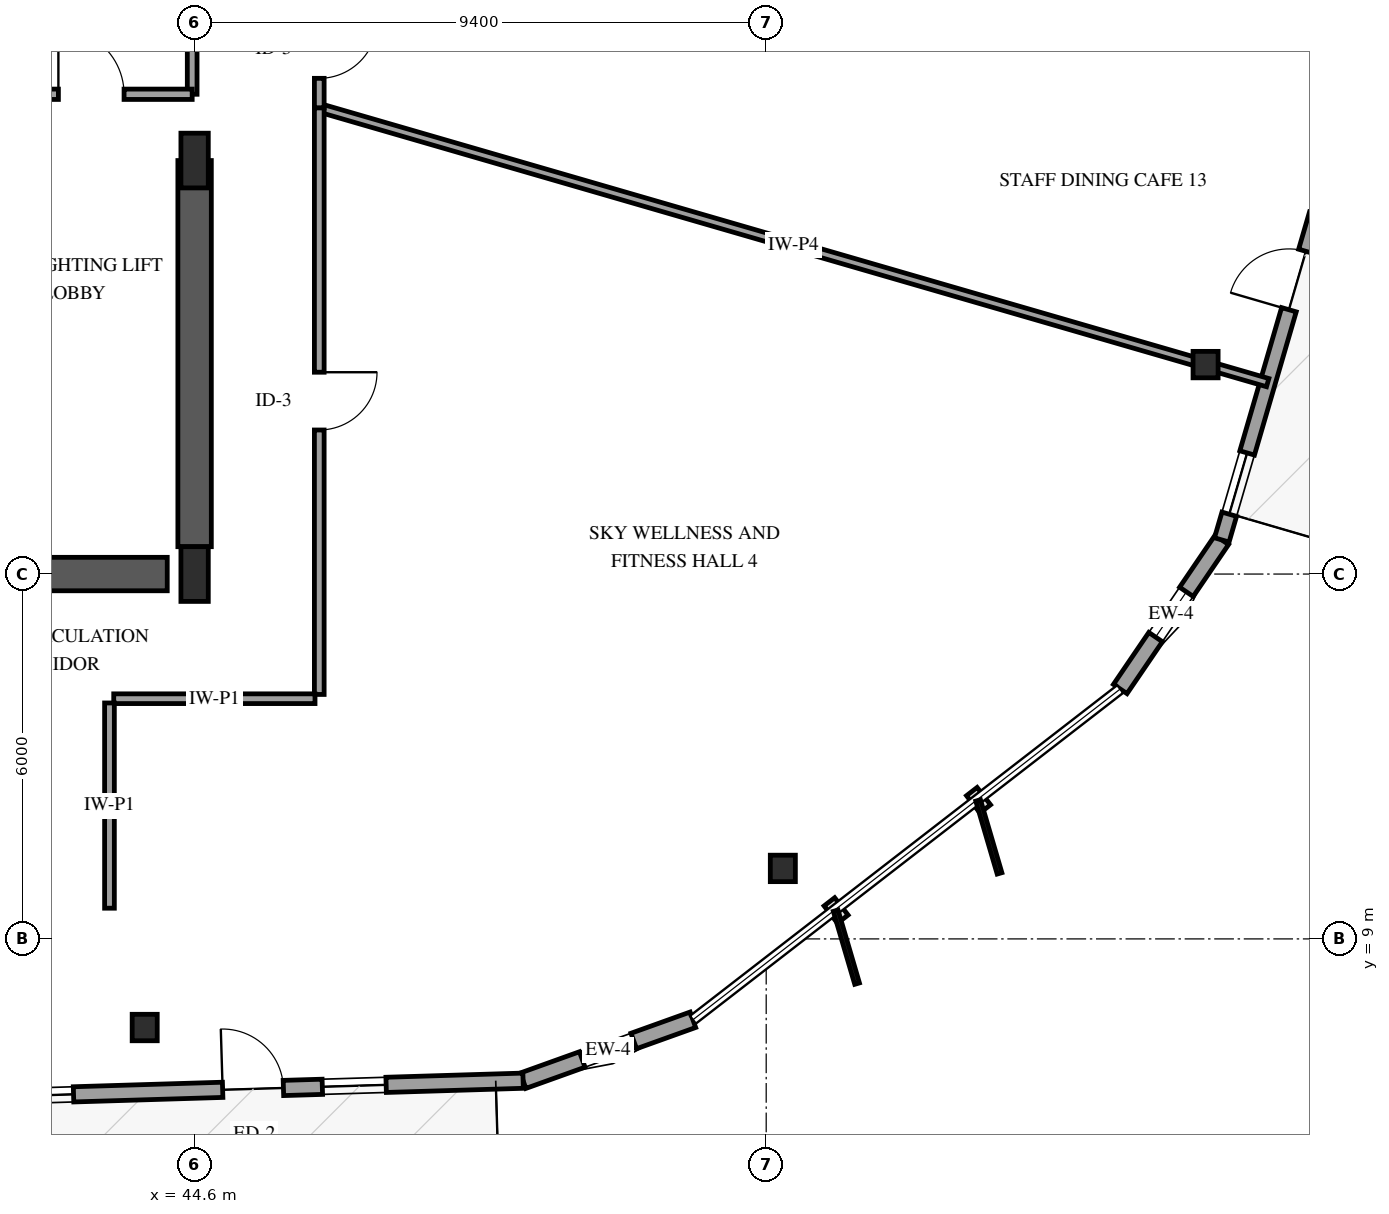
"""IFC4 building model, lengths in metres.
Left out: names, types, materials, properties, quantities, classifications, styles, units other than length and angle.
Written with IfcOpenShell. Run it as: python <this file> out.ifc"""

import sys

from ifc_helpers import new_model, si_unit, direction, frame, frame_2d, origin, origin_2d, place, context, subcontext, project, spatial, rectangle, i_section, extrude, element, fill, save


model = new_model("IFC4")
c1 = context("Model", 3, precision=1e-05, world=origin(), true_north=direction((0.0, 1.0)))
c2 = subcontext(c1, "Body", "Model", "MODEL_VIEW")
j1 = project(units=[si_unit("LENGTHUNIT", "METRE"), si_unit("PLANEANGLEUNIT", "RADIAN")], contexts=[c1])
p1 = place(None, origin())
s1 = spatial("IfcSite", under=j1, at=p1, CompositionType="ELEMENT")
p2 = place(p1, origin())
s2 = spatial("IfcBuilding", under=s1, at=p2, CompositionType="ELEMENT")
p3 = place(p2, frame((0.0, 0.0, 171.4)))
s3 = spatial("IfcBuildingStorey", under=s2, at=p3, CompositionType="ELEMENT", Elevation=171.4)
p4 = place(p3, frame((41.3, 15.0, 0.0), z_axis=(0.0, 0.0, 1.0), x_axis=(1.0, 0.0, 0.0)))
e1 = element("IfcWall", 1, at=p4, inside=s3, PredefinedType="SHEAR", context=c2, shape_type="SweptSolid", body=[
    extrude(rectangle(XDim=2.85, YDim=0.55, at=frame_2d((1.425, 0.0))), origin(), (0.0, 0.0, 1.0), 3.6),
])
p5 = place(p3, frame((44.6, 15.45, 0.0), z_axis=(0.0, 0.0, 1.0), x_axis=(0.0, 1.0, 0.0)))
e2 = element("IfcWall", 2, at=p5, inside=s3, PredefinedType="SHEAR", context=c2, shape_type="SweptSolid", body=[
    extrude(rectangle(XDim=6.35, YDim=0.55, at=frame_2d((3.175, 0.0))), origin(), (0.0, 0.0, 1.0), 3.6),
])
for number, where, z_axis, x_axis in (
    (3, (44.6, 15.0, 0.0), (0.0, 0.0, 1.0), (1.0, 0.0, 0.0)),
    (4, (44.6, 21.8, 0.0), (0.0, 0.0, 1.0), (1.0, 0.0, 0.0)),
):
    element("IfcColumn", number, at=place(p3, frame(where, z_axis=z_axis, x_axis=x_axis)), inside=s3, PredefinedType="PILASTER", context=c2, shape_type="SweptSolid", body=[
        extrude(rectangle(XDim=0.45, YDim=0.9, at=origin_2d()), origin(), (0.0, 0.0, 1.0), 3.6),
    ])
for number, where, z_axis, x_axis in (
    (5, (43.779, 7.542, 0.0), (0.0, 0.0, 1.0), (1.0, 0.0, 0.0)),
    (6, (54.274, 10.159, 0.0), (0.0, 0.0, 1.0), (1.0, 0.0, 0.0)),
    (7, (61.226, 18.444, 0.0), (0.0, 0.0, 1.0), (1.0, 0.0, 0.0)),
):
    element("IfcColumn", number, at=place(p3, frame(where, z_axis=z_axis, x_axis=x_axis)), inside=s3, PredefinedType="COLUMN", context=c2, shape_type="SweptSolid", body=[
        extrude(i_section(OverallWidth=0.412, OverallDepth=0.435, WebThickness=0.036, FlangeThickness=0.057, FilletRadius=0.038, at=origin_2d()), origin(), (0.0, 0.0, 1.0), 3.6),
    ])
p6 = place(p3, frame((50.002, 6.668, 0.0), z_axis=(0.0, 0.0, 1.0), x_axis=(0.94123626771, 0.337748853955, 0.0)))
e8 = element("IfcWall", 8, at=p6, inside=s3, PredefinedType="SOLIDWALL", context=c2, shape_type="SweptSolid", body=[
    extrude(rectangle(XDim=2.967, YDim=0.27, at=frame_2d((1.483, 0.0))), origin(), (0.0, 0.0, 1.0), 2.679),
])
p7 = place(p6, frame((1.033, 0.0, 0.75)))
e9 = element("IfcOpeningElement", 9, at=p7, cuts=e8, PredefinedType="OPENING", context=c2, shape_type="SweptSolid", body=[
    extrude(rectangle(XDim=0.9, YDim=1.5, at=frame_2d((0.45, 0.75))), frame((0.0, 0.145, 0.0), z_axis=(0.0, -1.0, 0.0), x_axis=(1.0, 0.0, 0.0)), (0.0, 0.0, 1.0), 0.29),
])
p8 = place(p3, frame((41.12, 6.398, 0.0), z_axis=(0.0, 0.0, 1.0), x_axis=(0.999539110065, 0.030357329429, 0.0)))
e10 = element("IfcWall", 10, at=p8, inside=s3, PredefinedType="SOLIDWALL", context=c2, shape_type="SweptSolid", body=[
    extrude(rectangle(XDim=8.887, YDim=0.25, at=frame_2d((4.443, 0.0))), origin(), (0.0, 0.0, 1.0), 2.679),
])
p9 = place(p8, frame((3.943, 0.0, 0.0)))
e11 = element("IfcOpeningElement", 11, at=p9, cuts=e10, PredefinedType="OPENING", context=c2, shape_type="SweptSolid", body=[
    extrude(rectangle(XDim=1.0, YDim=2.15, at=frame_2d((0.5, 1.075))), frame((0.0, 0.135, 0.0), z_axis=(0.0, -1.0, 0.0), x_axis=(1.0, 0.0, 0.0)), (0.0, 0.0, 1.0), 0.27),
])
p10 = place(p8, frame((0.44, 0.0, 0.72)))
e12 = element("IfcOpeningElement", 12, at=p10, cuts=e10, PredefinedType="OPENING", context=c2, shape_type="SweptSolid", body=[
    extrude(rectangle(XDim=1.05, YDim=1.55, at=frame_2d((0.525, 0.775))), frame((0.0, 0.135, 0.0), z_axis=(0.0, -1.0, 0.0), x_axis=(1.0, 0.0, 0.0)), (0.0, 0.0, 1.0), 0.27),
])
p11 = place(p8, frame((5.583, 0.0, 0.72)))
e13 = element("IfcOpeningElement", 13, at=p11, cuts=e10, PredefinedType="OPENING", context=c2, shape_type="SweptSolid", body=[
    extrude(rectangle(XDim=1.05, YDim=1.55, at=frame_2d((0.525, 0.775))), frame((0.0, 0.135, 0.0), z_axis=(0.0, -1.0, 0.0), x_axis=(1.0, 0.0, 0.0)), (0.0, 0.0, 1.0), 0.27),
])
p12 = place(p3, frame((59.822, 13.11, 0.0), z_axis=(0.0, 0.0, 1.0), x_axis=(0.563009904687, 0.826450148058, 0.0)))
e14 = element("IfcWall", 14, at=p12, inside=s3, PredefinedType="SOLIDWALL", context=c2, shape_type="SweptSolid", body=[
    extrude(rectangle(XDim=2.967, YDim=0.27, at=frame_2d((1.483, 0.0))), origin(), (0.0, 0.0, 1.0), 2.679),
])
p13 = place(p12, frame((1.033, 0.0, 0.75)))
e15 = element("IfcOpeningElement", 15, at=p13, cuts=e14, PredefinedType="OPENING", context=c2, shape_type="SweptSolid", body=[
    extrude(rectangle(XDim=0.9, YDim=1.5, at=frame_2d((0.45, 0.75))), frame((0.0, 0.145, 0.0), z_axis=(0.0, -1.0, 0.0), x_axis=(1.0, 0.0, 0.0)), (0.0, 0.0, 1.0), 0.29),
])
p14 = place(p3, frame((61.492, 15.561, 0.0), z_axis=(0.0, 0.0, 1.0), x_axis=(0.28, 0.96, 0.0)))
e16 = element("IfcWall", 16, at=p14, inside=s3, PredefinedType="SOLIDWALL", context=c2, shape_type="SweptSolid", body=[
    extrude(rectangle(XDim=8.887, YDim=0.25, at=frame_2d((4.443, 0.0))), origin(), (0.0, 0.0, 1.0), 2.679),
])
p15 = place(p14, frame((3.943, 0.0, 0.0)))
e17 = element("IfcOpeningElement", 17, at=p15, cuts=e16, PredefinedType="OPENING", context=c2, shape_type="SweptSolid", body=[
    extrude(rectangle(XDim=1.0, YDim=2.15, at=frame_2d((0.5, 1.075))), frame((0.0, 0.135, 0.0), z_axis=(0.0, -1.0, 0.0), x_axis=(1.0, 0.0, 0.0)), (0.0, 0.0, 1.0), 0.27),
])
p16 = place(p14, frame((0.44, 0.0, 0.72)))
e18 = element("IfcOpeningElement", 18, at=p16, cuts=e16, PredefinedType="OPENING", context=c2, shape_type="SweptSolid", body=[
    extrude(rectangle(XDim=1.05, YDim=1.55, at=frame_2d((0.525, 0.775))), frame((0.0, 0.135, 0.0), z_axis=(0.0, -1.0, 0.0), x_axis=(1.0, 0.0, 0.0)), (0.0, 0.0, 1.0), 0.27),
])
p17 = place(p14, frame((5.583, 0.0, 0.72)))
e19 = element("IfcOpeningElement", 19, at=p17, cuts=e16, PredefinedType="OPENING", context=c2, shape_type="SweptSolid", body=[
    extrude(rectangle(XDim=1.05, YDim=1.55, at=frame_2d((0.525, 0.775))), frame((0.0, 0.135, 0.0), z_axis=(0.0, -1.0, 0.0), x_axis=(1.0, 0.0, 0.0)), (0.0, 0.0, 1.0), 0.27),
])
p18 = place(p3, frame((46.65, 22.668, 0.0), z_axis=(0.0, 0.0, 1.0), x_axis=(0.960481163068, -0.278344993473, 0.0)))
e20 = element("IfcWall", 20, at=p18, inside=s3, PredefinedType="PARTITIONING", context=c2, shape_type="SweptSolid", body=[
    extrude(rectangle(XDim=16.239, YDim=0.14, at=frame_2d((8.12, 0.0))), origin(), (0.0, 0.0, 1.0), 3.3),
])
p19 = place(p3, frame((46.65, 22.668, 0.0), z_axis=(0.0, 0.0, 1.0), x_axis=(0.0, -1.0, 0.0)))
e21 = element("IfcWall", 21, at=p19, inside=s3, PredefinedType="PARTITIONING", context=c2, shape_type="SweptSolid", body=[
    extrude(rectangle(XDim=9.648, YDim=0.16, at=frame_2d((4.824, 0.0))), origin(), (0.0, 0.0, 1.0), 3.3),
])
p20 = place(p19, frame((4.349, 0.0, 0.0)))
e22 = element("IfcOpeningElement", 22, at=p20, cuts=e21, PredefinedType="OPENING", context=c2, shape_type="SweptSolid", body=[
    extrude(rectangle(XDim=0.95, YDim=2.15, at=frame_2d((0.475, 1.075))), frame((0.0, 0.09, 0.0), z_axis=(0.0, -1.0, 0.0), x_axis=(1.0, 0.0, 0.0)), (0.0, 0.0, 1.0), 0.18),
])
p21 = place(p3, frame((44.56, 29.8, 0.0), z_axis=(0.0, 0.0, 1.0), x_axis=(0.0, -1.0, 0.0)))
e23 = element("IfcWall", 23, at=p21, inside=s3, PredefinedType="PARTITIONING", context=c2, shape_type="SweptSolid", body=[
    extrude(rectangle(XDim=6.91, YDim=0.16, at=frame_2d((3.455, 0.0))), origin(), (0.0, 0.0, 1.0), 2.34),
])
p22 = place(p21, frame((2.915, 0.0, 0.0)))
e24 = element("IfcOpeningElement", 24, at=p22, cuts=e23, PredefinedType="OPENING", context=c2, shape_type="SweptSolid", body=[
    extrude(rectangle(XDim=1.08, YDim=2.15, at=frame_2d((0.54, 1.075))), frame((0.0, 0.09, 0.0), z_axis=(0.0, -1.0, 0.0), x_axis=(1.0, 0.0, 0.0)), (0.0, 0.0, 1.0), 0.18),
])
p23 = place(p3, frame((41.24, 22.89, 0.0), z_axis=(0.0, 0.0, 1.0), x_axis=(1.0, 0.0, 0.0)))
e25 = element("IfcWall", 25, at=p23, inside=s3, PredefinedType="PARTITIONING", context=c2, shape_type="SweptSolid", body=[
    extrude(rectangle(XDim=3.32, YDim=0.17, at=frame_2d((1.66, 0.0))), origin(), (0.0, 0.0, 1.0), 3.3),
])
p24 = place(p23, frame((1.12, 0.0, 0.0)))
e26 = element("IfcOpeningElement", 26, at=p24, cuts=e25, PredefinedType="OPENING", context=c2, shape_type="SweptSolid", body=[
    extrude(rectangle(XDim=1.08, YDim=2.15, at=frame_2d((0.54, 1.075))), frame((0.0, 0.095, 0.0), z_axis=(0.0, -1.0, 0.0), x_axis=(1.0, 0.0, 0.0)), (0.0, 0.0, 1.0), 0.19),
])
p25 = place(p3, frame((46.58, 12.95, 0.0), z_axis=(0.0, 0.0, 1.0), x_axis=(-1.0, 0.0, 0.0)))
e27 = element("IfcWall", 27, at=p25, inside=s3, PredefinedType="PARTITIONING", context=c2, shape_type="SweptSolid", body=[
    extrude(rectangle(XDim=3.31, YDim=0.16, at=frame_2d((1.655, 0.0))), origin(), (0.0, 0.0, 1.0), 3.3),
])
p26 = place(p3, frame((46.65, 24.586, 0.0), z_axis=(0.0, 0.0, 1.0), x_axis=(0.0, -1.0, 0.0)))
e28 = element("IfcWall", 28, at=p26, inside=s3, PredefinedType="PARTITIONING", context=c2, shape_type="SweptSolid", body=[
    extrude(rectangle(XDim=1.918, YDim=0.16, at=frame_2d((0.959, 0.0))), origin(), (0.0, 0.0, 1.0), 3.3),
])
p27 = place(p26, frame((0.484, 0.0, 0.0)))
e29 = element("IfcOpeningElement", 29, at=p27, cuts=e28, PredefinedType="OPENING", context=c2, shape_type="SweptSolid", body=[
    extrude(rectangle(XDim=0.95, YDim=2.15, at=frame_2d((0.475, 1.075))), frame((0.0, 0.09, 0.0), z_axis=(0.0, -1.0, 0.0), x_axis=(1.0, 0.0, 0.0)), (0.0, 0.0, 1.0), 0.18),
])
p28 = place(p3, frame((43.2, 12.88, 0.0), z_axis=(0.0, 0.0, 1.0), x_axis=(0.0, -1.0, 0.0)))
e30 = element("IfcWall", 30, at=p28, inside=s3, PredefinedType="PARTITIONING", context=c2, shape_type="SweptSolid", body=[
    extrude(rectangle(XDim=3.375, YDim=0.16, at=frame_2d((1.688, 0.0))), origin(), (0.0, 0.0, 1.0), 2.595),
])
p29 = place(p7, origin())
e31 = element("IfcWindow", 31, at=p29, inside=s3, PartitioningType="SINGLE_PANEL", PredefinedType="WINDOW", context=c2, shape_type="SweptSolid", body=[
    extrude(rectangle(XDim=0.9, YDim=1.5, at=frame_2d((0.45, 0.75))), frame((0.0, 0.03, 0.0), z_axis=(0.0, -1.0, 0.0), x_axis=(1.0, 0.0, 0.0)), (0.0, 0.0, 1.0), 0.06),
])
fill(e9, e31)
p30 = place(p9, origin())
e32 = element("IfcDoor", 32, at=p30, inside=s3, OperationType="SINGLE_SWING_LEFT", PredefinedType="DOOR", context=c2, shape_type="SweptSolid", body=[
    extrude(rectangle(XDim=1.0, YDim=2.15, at=frame_2d((0.5, 1.075))), frame((0.0, 0.025, 0.0), z_axis=(0.0, -1.0, 0.0), x_axis=(1.0, 0.0, 0.0)), (0.0, 0.0, 1.0), 0.05),
])
fill(e11, e32)
p31 = place(p10, origin())
e33 = element("IfcWindow", 33, at=p31, inside=s3, PartitioningType="SINGLE_PANEL", PredefinedType="WINDOW", context=c2, shape_type="SweptSolid", body=[
    extrude(rectangle(XDim=1.05, YDim=1.55, at=frame_2d((0.525, 0.775))), frame((0.0, 0.03, 0.0), z_axis=(0.0, -1.0, 0.0), x_axis=(1.0, 0.0, 0.0)), (0.0, 0.0, 1.0), 0.06),
])
fill(e12, e33)
p32 = place(p11, origin())
e34 = element("IfcWindow", 34, at=p32, inside=s3, PartitioningType="SINGLE_PANEL", PredefinedType="WINDOW", context=c2, shape_type="SweptSolid", body=[
    extrude(rectangle(XDim=1.05, YDim=1.55, at=frame_2d((0.525, 0.775))), frame((0.0, 0.03, 0.0), z_axis=(0.0, -1.0, 0.0), x_axis=(1.0, 0.0, 0.0)), (0.0, 0.0, 1.0), 0.06),
])
fill(e13, e34)
p33 = place(p13, origin())
e35 = element("IfcWindow", 35, at=p33, inside=s3, PartitioningType="SINGLE_PANEL", PredefinedType="WINDOW", context=c2, shape_type="SweptSolid", body=[
    extrude(rectangle(XDim=0.9, YDim=1.5, at=frame_2d((0.45, 0.75))), frame((0.0, 0.03, 0.0), z_axis=(0.0, -1.0, 0.0), x_axis=(1.0, 0.0, 0.0)), (0.0, 0.0, 1.0), 0.06),
])
fill(e15, e35)
p34 = place(p15, origin())
e36 = element("IfcDoor", 36, at=p34, inside=s3, OperationType="SINGLE_SWING_LEFT", PredefinedType="DOOR", context=c2, shape_type="SweptSolid", body=[
    extrude(rectangle(XDim=1.0, YDim=2.15, at=frame_2d((0.5, 1.075))), frame((0.0, 0.025, 0.0), z_axis=(0.0, -1.0, 0.0), x_axis=(1.0, 0.0, 0.0)), (0.0, 0.0, 1.0), 0.05),
])
fill(e17, e36)
p35 = place(p16, origin())
e37 = element("IfcWindow", 37, at=p35, inside=s3, PartitioningType="SINGLE_PANEL", PredefinedType="WINDOW", context=c2, shape_type="SweptSolid", body=[
    extrude(rectangle(XDim=1.05, YDim=1.55, at=frame_2d((0.525, 0.775))), frame((0.0, 0.03, 0.0), z_axis=(0.0, -1.0, 0.0), x_axis=(1.0, 0.0, 0.0)), (0.0, 0.0, 1.0), 0.06),
])
fill(e18, e37)
p36 = place(p20, origin())
e38 = element("IfcDoor", 38, at=p36, inside=s3, OperationType="SINGLE_SWING_LEFT", PredefinedType="DOOR", context=c2, shape_type="SweptSolid", body=[
    extrude(rectangle(XDim=0.95, YDim=2.15, at=frame_2d((0.475, 1.075))), frame((0.0, 0.025, 0.0), z_axis=(0.0, -1.0, 0.0), x_axis=(1.0, 0.0, 0.0)), (0.0, 0.0, 1.0), 0.05),
])
fill(e22, e38)
p37 = place(p24, origin())
e39 = element("IfcDoor", 39, at=p37, inside=s3, OperationType="SINGLE_SWING_LEFT", PredefinedType="DOOR", context=c2, shape_type="SweptSolid", body=[
    extrude(rectangle(XDim=1.08, YDim=2.15, at=frame_2d((0.54, 1.075))), frame((0.0, 0.025, 0.0), z_axis=(0.0, -1.0, 0.0), x_axis=(1.0, 0.0, 0.0)), (0.0, 0.0, 1.0), 0.05),
])
fill(e26, e39)
p38 = place(p27, origin())
e40 = element("IfcDoor", 40, at=p38, inside=s3, OperationType="SINGLE_SWING_LEFT", PredefinedType="DOOR", context=c2, shape_type="SweptSolid", body=[
    extrude(rectangle(XDim=0.95, YDim=2.15, at=frame_2d((0.475, 1.075))), frame((0.0, 0.025, 0.0), z_axis=(0.0, -1.0, 0.0), x_axis=(1.0, 0.0, 0.0)), (0.0, 0.0, 1.0), 0.05),
])
fill(e29, e40)
save(model, sys.argv[1])
